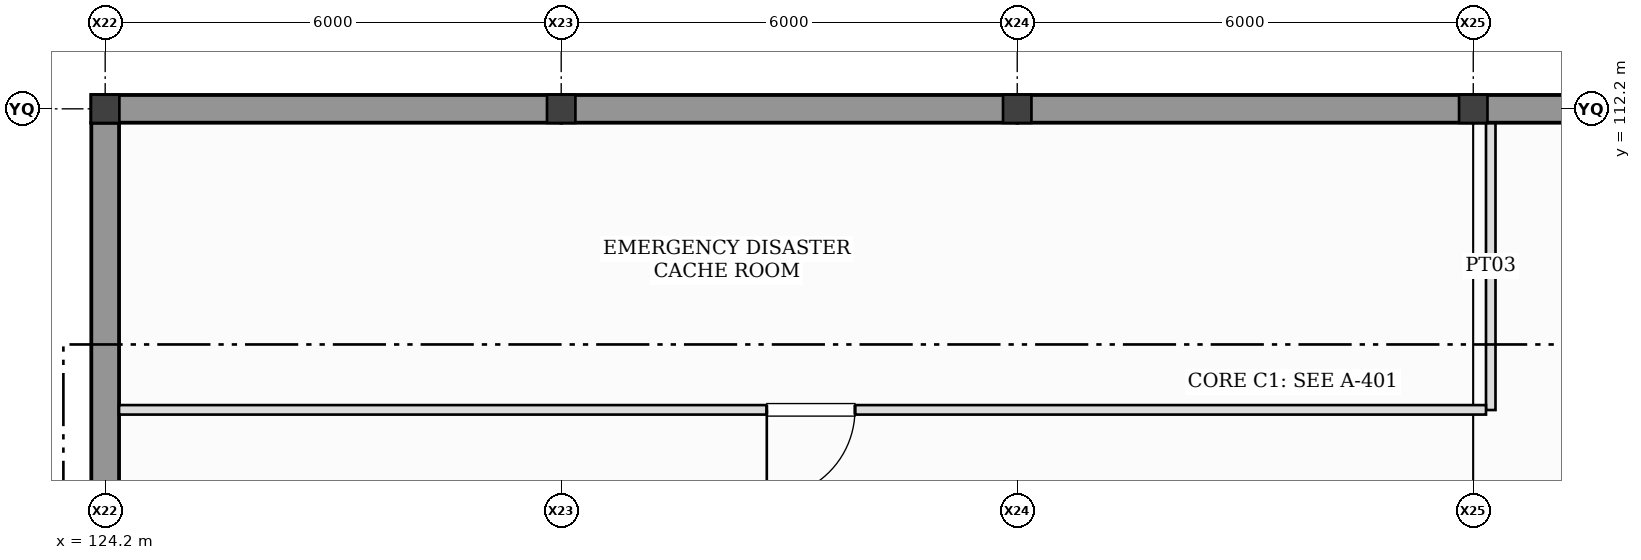
"""IFC4 building model, lengths in metres.
Left out: names, types, materials, properties, quantities, classifications, styles, units other than length and angle.
Written with IfcOpenShell. Run it as: python <this file> out.ifc"""

import sys

from ifc_helpers import new_model, si_unit, direction, frame, frame_2d, origin, origin_2d, place, context, subcontext, project, spatial, rectangle, i_section, extrude, element, fill, save


model = new_model("IFC4")
c1 = context("Model", 3, precision=1e-05, world=origin(), true_north=direction((0.0, 1.0)))
c2 = subcontext(c1, "Body", "Model", "MODEL_VIEW")
j1 = project(units=[si_unit("LENGTHUNIT", "METRE"), si_unit("PLANEANGLEUNIT", "RADIAN")], contexts=[c1])
p1 = place(None, origin())
s1 = spatial("IfcSite", under=j1, at=p1, CompositionType="ELEMENT")
p2 = place(p1, origin())
s2 = spatial("IfcBuilding", under=s1, at=p2, CompositionType="ELEMENT")
p3 = place(p2, frame((0.0, 0.0, -4.2)))
s3 = spatial("IfcBuildingStorey", under=s2, at=p3, CompositionType="ELEMENT", Elevation=-4.2)
for number, where, z_axis, x_axis in (
    (1, (124.2, 112.2, -0.45), (0.0, 0.0, 1.0), (1.0, 0.0, 0.0)),
    (2, (130.2, 112.2, -0.45), (0.0, 0.0, 1.0), (1.0, 0.0, 0.0)),
    (3, (136.2, 112.2, -0.45), (0.0, 0.0, 1.0), (1.0, 0.0, 0.0)),
    (4, (142.2, 112.2, -0.45), (0.0, 0.0, 1.0), (1.0, 0.0, 0.0)),
):
    element("IfcColumn", number, at=place(p3, frame(where, z_axis=z_axis, x_axis=x_axis)), inside=s3, PredefinedType="COLUMN", context=c2, shape_type="SweptSolid", body=[
        extrude(i_section(OverallWidth=0.374, OverallDepth=0.372, WebThickness=0.016, FlangeThickness=0.026, at=origin_2d()), origin(), (0.0, 0.0, 1.0), 4.65),
    ])
p4 = place(p3, frame((130.199, 112.2, 0.0), z_axis=(0.0, 0.0, 1.0), x_axis=(-1.0, 0.0, 0.0)))
e5 = element("IfcWall", 5, at=p4, inside=s3, PredefinedType="SHEAR", context=c2, shape_type="SweptSolid", body=[
    extrude(rectangle(XDim=6.181, YDim=0.365, at=frame_2d((3.091, 0.0))), origin(), (0.0, 0.0, 1.0), 3.85),
])
for number, where, z_axis, x_axis in (
    (6, (136.199, 112.2, 0.0), (0.0, 0.0, 1.0), (-1.0, 0.0, 0.0)),
    (7, (142.199, 112.2, 0.0), (0.0, 0.0, 1.0), (-1.0, 0.0, 0.0)),
    (8, (148.199, 112.2, 0.0), (0.0, 0.0, 1.0), (-1.0, 0.0, 0.0)),
):
    element("IfcWall", number, at=place(p3, frame(where, z_axis=z_axis, x_axis=x_axis)), inside=s3, PredefinedType="SHEAR", context=c2, shape_type="SweptSolid", body=[
        extrude(rectangle(XDim=5.998, YDim=0.365, at=frame_2d((2.999, 0.0))), origin(), (0.0, 0.0, 1.0), 3.85),
    ])
p5 = place(p3, frame((124.2, 112.015, 0.0), z_axis=(0.0, 0.0, 1.0), x_axis=(0.0, -1.0, 0.0)))
e9 = element("IfcWall", 9, at=p5, inside=s3, PredefinedType="SHEAR", context=c2, shape_type="SweptSolid", body=[
    extrude(rectangle(XDim=5.814, YDim=0.365, at=frame_2d((2.907, 0.0))), origin(), (0.0, 0.0, 1.0), 3.85),
])
p6 = place(p3, frame((142.43, 112.018, 0.0), z_axis=(0.0, 0.0, 1.0), x_axis=(0.0, -1.0, 0.0)))
e10 = element("IfcWall", 10, at=p6, inside=s3, PredefinedType="PARTITIONING", context=c2, shape_type="SweptSolid", body=[
    extrude(rectangle(XDim=3.78, YDim=0.125, at=frame_2d((1.89, 0.0))), origin(), (0.0, 0.0, 1.0), 3.79),
])
p7 = place(p3, frame((142.367, 108.24, 0.0), z_axis=(0.0, 0.0, 1.0), x_axis=(-1.0, 0.0, 0.0)))
e11 = element("IfcWall", 11, at=p7, inside=s3, PredefinedType="PARTITIONING", context=c2, shape_type="SweptSolid", body=[
    extrude(rectangle(XDim=17.985, YDim=0.125, at=frame_2d((8.992, 0.0))), origin(), (0.0, 0.0, 1.0), 3.79),
])
p8 = place(p7, frame((8.302, 0.0, 0.0)))
e12 = element("IfcOpeningElement", 12, at=p8, cuts=e11, PredefinedType="OPENING", context=c2, shape_type="SweptSolid", body=[
    extrude(rectangle(XDim=1.16, YDim=2.2, at=frame_2d((0.58, 1.1))), frame((0.0, 0.073, 0.0), z_axis=(0.0, -1.0, 0.0), x_axis=(1.0, 0.0, 0.0)), (0.0, 0.0, 1.0), 0.145),
])
p9 = place(p8, frame((1.16, 0.0, 0.0), z_axis=(0.0, 0.0, 1.0), x_axis=(-1.0, 0.0, 0.0)))
e13 = element("IfcDoor", 13, at=p9, inside=s3, OperationType="SINGLE_SWING_RIGHT", PredefinedType="DOOR", context=c2, shape_type="SweptSolid", body=[
    extrude(rectangle(XDim=1.16, YDim=2.2, at=frame_2d((0.58, 1.1))), frame((0.0, 0.025, 0.0), z_axis=(0.0, -1.0, 0.0), x_axis=(1.0, 0.0, 0.0)), (0.0, 0.0, 1.0), 0.05),
])
fill(e12, e13)
save(model, sys.argv[1])
